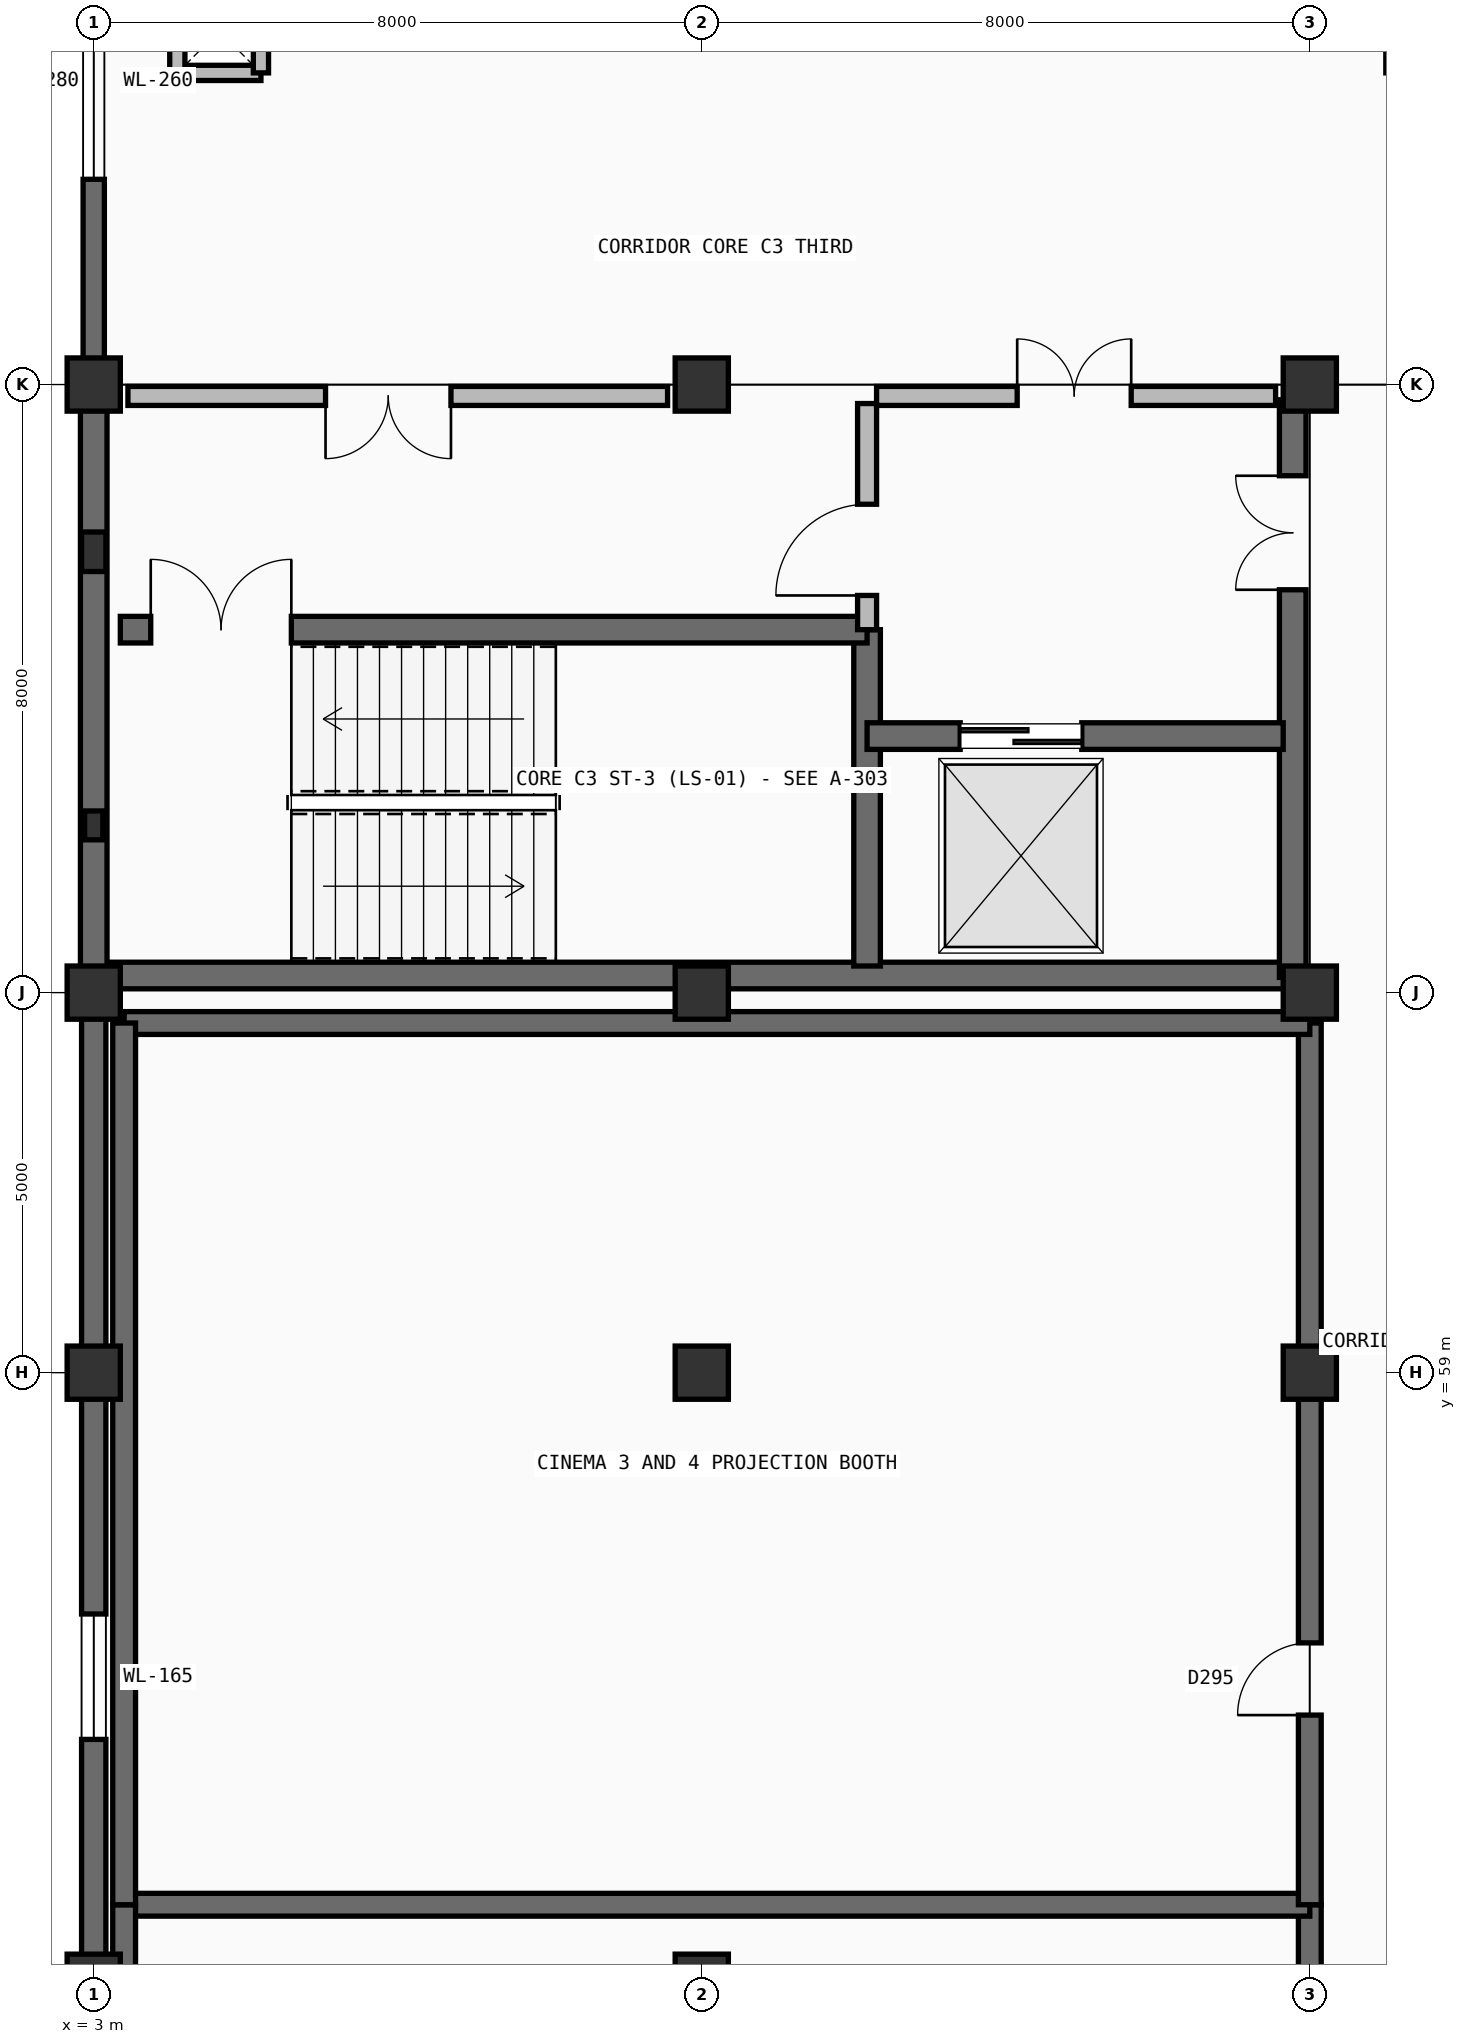
"""IFC4 building model, lengths in metres.
Left out: names, types, materials, properties, quantities, classifications, styles, units other than length and angle.
Written with IfcOpenShell. Run it as: python <this file> out.ifc"""

import sys

from ifc_helpers import new_model, si_unit, direction, frame, frame_2d, origin, origin_2d, place, context, subcontext, project, spatial, rectangle, extrude, element, fill, save


model = new_model("IFC4")
c1 = context("Model", 3, precision=1e-05, world=origin(), true_north=direction((0.0, 1.0)))
c2 = subcontext(c1, "Body", "Model", "MODEL_VIEW")
j1 = project(units=[si_unit("LENGTHUNIT", "METRE"), si_unit("PLANEANGLEUNIT", "RADIAN")], contexts=[c1])
p1 = place(None, origin())
s1 = spatial("IfcSite", under=j1, at=p1, CompositionType="ELEMENT")
p2 = place(p1, origin())
s2 = spatial("IfcBuilding", under=s1, at=p2, CompositionType="ELEMENT")
p3 = place(p2, frame((0.0, 0.0, 14.4)))
s3 = spatial("IfcBuildingStorey", under=s2, at=p3, CompositionType="ELEMENT", Elevation=14.4)
for number, where, z_axis, x_axis in (
    (1, (3.0, 51.0, 0.0), (0.0, 0.0, 1.0), (1.0, 0.0, 0.0)),
    (2, (3.0, 59.0, 0.0), (0.0, 0.0, 1.0), (1.0, 0.0, 0.0)),
    (3, (3.0, 64.0, 0.0), (0.0, 0.0, 1.0), (1.0, 0.0, 0.0)),
    (4, (3.0, 72.0, 0.0), (0.0, 0.0, 1.0), (1.0, 0.0, 0.0)),
    (5, (11.0, 51.0, 0.0), (0.0, 0.0, 1.0), (1.0, 0.0, 0.0)),
    (6, (11.0, 59.0, 0.0), (0.0, 0.0, 1.0), (1.0, 0.0, 0.0)),
    (7, (11.0, 64.0, 0.0), (0.0, 0.0, 1.0), (1.0, 0.0, 0.0)),
    (8, (11.0, 72.0, 0.0), (0.0, 0.0, 1.0), (1.0, 0.0, 0.0)),
    (9, (19.0, 59.0, 0.0), (0.0, 0.0, 1.0), (1.0, 0.0, 0.0)),
    (10, (19.0, 64.0, 0.0), (0.0, 0.0, 1.0), (1.0, 0.0, 0.0)),
    (11, (19.0, 72.0, 0.0), (0.0, 0.0, 1.0), (1.0, 0.0, 0.0)),
):
    element("IfcColumn", number, at=place(p3, frame(where, z_axis=z_axis, x_axis=x_axis)), inside=s3, PredefinedType="COLUMN", context=c2, shape_type="SweptSolid", body=[
        extrude(rectangle(XDim=0.7, YDim=0.7, at=origin_2d()), origin(), (0.0, 0.0, 1.0), 4.5),
    ])
p4 = place(p3, frame((3.0, 66.2, 0.0), z_axis=(0.0, 0.0, 1.0), x_axis=(0.0, 1.0, 0.0)))
e12 = element("IfcColumn", 12, at=p4, inside=s3, PredefinedType="PILASTER", context=c2, shape_type="SweptSolid", body=[
    extrude(rectangle(XDim=0.38, YDim=0.24, at=origin_2d()), origin(), (0.0, 0.0, 1.0), 4.5),
])
p5 = place(p3, frame((3.0, 69.8, 0.0), z_axis=(0.0, 0.0, 1.0), x_axis=(0.0, 1.0, 0.0)))
e13 = element("IfcColumn", 13, at=p5, inside=s3, PredefinedType="PILASTER", context=c2, shape_type="SweptSolid", body=[
    extrude(rectangle(XDim=0.52, YDim=0.32, at=origin_2d()), origin(), (0.0, 0.0, 1.0), 4.5),
])
p6 = place(p3, frame((3.0, 51.0, 0.0), z_axis=(0.0, 0.0, 1.0), x_axis=(0.0, 1.0, 0.0)))
e14 = element("IfcWall", 14, at=p6, inside=s3, PredefinedType="SOLIDWALL", context=c2, shape_type="SweptSolid", body=[
    extrude(rectangle(XDim=8.0, YDim=0.32, at=frame_2d((4.0, 0.0))), origin(), (0.0, 0.0, 1.0), 4.5),
])
p7 = place(p6, frame((3.175, 0.0, 1.1)))
e15 = element("IfcOpeningElement", 15, at=p7, cuts=e14, PredefinedType="OPENING", context=c2, shape_type="SweptSolid", body=[
    extrude(rectangle(XDim=1.65, YDim=0.8, at=frame_2d((0.825, 0.4))), frame((0.0, 0.17, 0.0), z_axis=(0.0, -1.0, 0.0), x_axis=(1.0, 0.0, 0.0)), (0.0, 0.0, 1.0), 0.34),
])
p8 = place(p3, frame((3.0, 59.0, 0.0), z_axis=(0.0, 0.0, 1.0), x_axis=(0.0, 1.0, 0.0)))
e16 = element("IfcWall", 16, at=p8, inside=s3, PredefinedType="SOLIDWALL", context=c2, shape_type="SweptSolid", body=[
    extrude(rectangle(XDim=5.0, YDim=0.32, at=frame_2d((2.5, 0.0))), origin(), (0.0, 0.0, 1.0), 4.5),
])
p9 = place(p3, frame((3.0, 64.0, 0.0), z_axis=(0.0, 0.0, 1.0), x_axis=(0.0, 1.0, 0.0)))
e17 = element("IfcWall", 17, at=p9, inside=s3, PredefinedType="SHEAR", context=c2, shape_type="SweptSolid", body=[
    extrude(rectangle(XDim=8.0, YDim=0.35, at=frame_2d((4.0, 0.0))), origin(), (0.0, 0.0, 1.0), 4.5),
])
p10 = place(p3, frame((3.0, 72.0, 0.0), z_axis=(0.0, 0.0, 1.0), x_axis=(0.0, 1.0, 0.0)))
e18 = element("IfcWall", 18, at=p10, inside=s3, PredefinedType="SOLIDWALL", context=c2, shape_type="SweptSolid", body=[
    extrude(rectangle(XDim=8.0, YDim=0.28, at=frame_2d((4.0, 0.0))), origin(), (0.0, 0.0, 1.0), 4.5),
])
p11 = place(p10, frame((2.7, 0.0, 1.1)))
e19 = element("IfcOpeningElement", 19, at=p11, cuts=e18, PredefinedType="OPENING", context=c2, shape_type="SweptSolid", body=[
    extrude(rectangle(XDim=2.6, YDim=1.2, at=frame_2d((1.3, 0.6))), frame((0.0, 0.15, 0.0), z_axis=(0.0, -1.0, 0.0), x_axis=(1.0, 0.0, 0.0)), (0.0, 0.0, 1.0), 0.3),
])
p12 = place(p3, frame((3.2, 64.225, 0.0), z_axis=(0.0, 0.0, 1.0), x_axis=(1.0, 0.0, 0.0)))
e20 = element("IfcWall", 20, at=p12, inside=s3, PredefinedType="SHEAR", context=c2, shape_type="SweptSolid", body=[
    extrude(rectangle(XDim=15.6, YDim=0.35, at=frame_2d((7.8, 0.0))), origin(), (0.0, 0.0, 1.0), 4.2),
])
p13 = place(p3, frame((13.175, 64.35, 0.0), z_axis=(0.0, 0.0, 1.0), x_axis=(0.0, 1.0, 0.0)))
e21 = element("IfcWall", 21, at=p13, inside=s3, PredefinedType="SHEAR", context=c2, shape_type="SweptSolid", body=[
    extrude(rectangle(XDim=4.425, YDim=0.35, at=frame_2d((2.212, 0.0))), origin(), (0.0, 0.0, 1.0), 4.2),
])
p14 = place(p3, frame((18.775, 64.2, 0.0), z_axis=(0.0, 0.0, 1.0), x_axis=(0.0, 1.0, 0.0)))
e22 = element("IfcWall", 22, at=p14, inside=s3, PredefinedType="SHEAR", context=c2, shape_type="SweptSolid", body=[
    extrude(rectangle(XDim=7.6, YDim=0.35, at=frame_2d((3.8, 0.0))), origin(), (0.0, 0.0, 1.0), 4.2),
])
p15 = place(p14, frame((5.1, 0.0, 0.0)))
e23 = element("IfcOpeningElement", 23, at=p15, cuts=e22, PredefinedType="OPENING", context=c2, shape_type="SweptSolid", body=[
    extrude(rectangle(XDim=1.5, YDim=2.2, at=frame_2d((0.75, 1.1))), frame((0.0, 0.185, 0.0), z_axis=(0.0, -1.0, 0.0), x_axis=(1.0, 0.0, 0.0)), (0.0, 0.0, 1.0), 0.37),
])
p16 = place(p3, frame((3.35, 68.775, 0.0), z_axis=(0.0, 0.0, 1.0), x_axis=(1.0, 0.0, 0.0)))
e24 = element("IfcWall", 24, at=p16, inside=s3, PredefinedType="SHEAR", context=c2, shape_type="SweptSolid", body=[
    extrude(rectangle(XDim=9.825, YDim=0.35, at=frame_2d((4.913, 0.0))), origin(), (0.0, 0.0, 1.0), 4.2),
])
p17 = place(p16, frame((0.4, 0.0, 0.0)))
e25 = element("IfcOpeningElement", 25, at=p17, cuts=e24, PredefinedType="OPENING", context=c2, shape_type="SweptSolid", body=[
    extrude(rectangle(XDim=1.85, YDim=2.25, at=frame_2d((0.925, 1.125))), frame((0.0, 0.185, 0.0), z_axis=(0.0, -1.0, 0.0), x_axis=(1.0, 0.0, 0.0)), (0.0, 0.0, 1.0), 0.37),
])
p18 = place(p3, frame((13.175, 67.375, 0.0), z_axis=(0.0, 0.0, 1.0), x_axis=(1.0, 0.0, 0.0)))
e26 = element("IfcWall", 26, at=p18, inside=s3, PredefinedType="SHEAR", context=c2, shape_type="SweptSolid", body=[
    extrude(rectangle(XDim=5.475, YDim=0.35, at=frame_2d((2.737, 0.0))), origin(), (0.0, 0.0, 1.0), 4.2),
])
p19 = place(p18, frame((1.225, 0.0, 0.0)))
e27 = element("IfcOpeningElement", 27, at=p19, cuts=e26, PredefinedType="OPENING", context=c2, shape_type="SweptSolid", body=[
    extrude(rectangle(XDim=1.6, YDim=2.4, at=frame_2d((0.8, 1.2))), frame((0.0, 0.185, 0.0), z_axis=(0.0, -1.0, 0.0), x_axis=(1.0, 0.0, 0.0)), (0.0, 0.0, 1.0), 0.37),
])
p20 = place(p3, frame((13.175, 68.775, 0.0), z_axis=(0.0, 0.0, 1.0), x_axis=(0.0, 1.0, 0.0)))
e28 = element("IfcWall", 28, at=p20, inside=s3, PredefinedType="PARTITIONING", context=c2, shape_type="SweptSolid", body=[
    extrude(rectangle(XDim=2.975, YDim=0.25, at=frame_2d((1.488, 0.0))), origin(), (0.0, 0.0, 1.0), 4.2),
])
p21 = place(p20, frame((0.45, 0.0, 0.0)))
e29 = element("IfcOpeningElement", 29, at=p21, cuts=e28, PredefinedType="OPENING", context=c2, shape_type="SweptSolid", body=[
    extrude(rectangle(XDim=1.2, YDim=2.2, at=frame_2d((0.6, 1.1))), frame((0.0, 0.135, 0.0), z_axis=(0.0, -1.0, 0.0), x_axis=(1.0, 0.0, 0.0)), (0.0, 0.0, 1.0), 0.27),
])
p22 = place(p3, frame((3.45, 71.85, 0.0), z_axis=(0.0, 0.0, 1.0), x_axis=(1.0, 0.0, 0.0)))
e30 = element("IfcWall", 30, at=p22, inside=s3, PredefinedType="PARTITIONING", context=c2, shape_type="SweptSolid", body=[
    extrude(rectangle(XDim=7.1, YDim=0.25, at=frame_2d((3.55, 0.0))), origin(), (0.0, 0.0, 1.0), 3.605),
])
p23 = place(p22, frame((2.6, 0.0, 0.0)))
e31 = element("IfcOpeningElement", 31, at=p23, cuts=e30, PredefinedType="OPENING", context=c2, shape_type="SweptSolid", body=[
    extrude(rectangle(XDim=1.65, YDim=2.25, at=frame_2d((0.825, 1.125))), frame((0.0, 0.135, 0.0), z_axis=(0.0, -1.0, 0.0), x_axis=(1.0, 0.0, 0.0)), (0.0, 0.0, 1.0), 0.27),
])
p24 = place(p3, frame((13.3, 71.85, 0.0), z_axis=(0.0, 0.0, 1.0), x_axis=(1.0, 0.0, 0.0)))
e32 = element("IfcWall", 32, at=p24, inside=s3, PredefinedType="PARTITIONING", context=c2, shape_type="SweptSolid", body=[
    extrude(rectangle(XDim=5.25, YDim=0.25, at=frame_2d((2.625, 0.0))), origin(), (0.0, 0.0, 1.0), 3.605),
])
p25 = place(p24, frame((1.85, 0.0, 0.0)))
e33 = element("IfcOpeningElement", 33, at=p25, cuts=e32, PredefinedType="OPENING", context=c2, shape_type="SweptSolid", body=[
    extrude(rectangle(XDim=1.5, YDim=2.2, at=frame_2d((0.75, 1.1))), frame((0.0, 0.135, 0.0), z_axis=(0.0, -1.0, 0.0), x_axis=(1.0, 0.0, 0.0)), (0.0, 0.0, 1.0), 0.27),
])
p26 = place(p3, frame((19.0, 38.6, 0.0), z_axis=(0.0, 0.0, 1.0), x_axis=(0.0, 1.0, 0.0)))
e34 = element("IfcWall", 34, at=p26, inside=s3, PredefinedType="SHEAR", context=c2, shape_type="SweptSolid", body=[
    extrude(rectangle(XDim=13.4, YDim=0.3, at=frame_2d((6.7, 0.0))), origin(), (0.0, 0.0, 1.0), 4.2),
])
p27 = place(p26, frame((7.674, 0.0, 0.0)))
e35 = element("IfcOpeningElement", 35, at=p27, cuts=e34, PredefinedType="OPENING", context=c2, shape_type="SweptSolid", body=[
    extrude(rectangle(XDim=1.5, YDim=2.2, at=frame_2d((0.75, 1.1))), frame((0.0, 0.16, 0.0), z_axis=(0.0, -1.0, 0.0), x_axis=(1.0, 0.0, 0.0)), (0.0, 0.0, 1.0), 0.32),
])
p28 = place(p3, frame((3.4, 52.0, 0.0), z_axis=(0.0, 0.0, 1.0), x_axis=(1.0, 0.0, 0.0)))
e36 = element("IfcWall", 36, at=p28, inside=s3, PredefinedType="SHEAR", context=c2, shape_type="SweptSolid", body=[
    extrude(rectangle(XDim=15.6, YDim=0.3, at=frame_2d((7.8, 0.0))), origin(), (0.0, 0.0, 1.0), 4.2),
])
p29 = place(p3, frame((3.4, 38.6, 0.0), z_axis=(0.0, 0.0, 1.0), x_axis=(0.0, 1.0, 0.0)))
e37 = element("IfcWall", 37, at=p29, inside=s3, PredefinedType="SHEAR", context=c2, shape_type="SweptSolid", body=[
    extrude(rectangle(XDim=13.4, YDim=0.3, at=frame_2d((6.7, 0.0))), origin(), (0.0, 0.0, 1.0), 4.2),
])
p30 = place(p3, frame((19.0, 52.0, 0.0), z_axis=(0.0, 0.0, 1.0), x_axis=(0.0, 1.0, 0.0)))
e38 = element("IfcWall", 38, at=p30, inside=s3, PredefinedType="SHEAR", context=c2, shape_type="SweptSolid", body=[
    extrude(rectangle(XDim=11.6, YDim=0.3, at=frame_2d((5.8, 0.0))), origin(), (0.0, 0.0, 1.0), 4.2),
])
p31 = place(p30, frame((2.495, 0.0, 0.0)))
e39 = element("IfcOpeningElement", 39, at=p31, cuts=e38, PredefinedType="OPENING", context=c2, shape_type="SweptSolid", body=[
    extrude(rectangle(XDim=0.95, YDim=2.1, at=frame_2d((0.475, 1.05))), frame((0.0, 0.16, 0.0), z_axis=(0.0, -1.0, 0.0), x_axis=(1.0, 0.0, 0.0)), (0.0, 0.0, 1.0), 0.32),
])
p32 = place(p3, frame((3.4, 63.6, 0.0), z_axis=(0.0, 0.0, 1.0), x_axis=(1.0, 0.0, 0.0)))
e40 = element("IfcWall", 40, at=p32, inside=s3, PredefinedType="SHEAR", context=c2, shape_type="SweptSolid", body=[
    extrude(rectangle(XDim=15.6, YDim=0.3, at=frame_2d((7.8, 0.0))), origin(), (0.0, 0.0, 1.0), 4.2),
])
p33 = place(p3, frame((3.4, 52.0, 0.0), z_axis=(0.0, 0.0, 1.0), x_axis=(0.0, 1.0, 0.0)))
e41 = element("IfcWall", 41, at=p33, inside=s3, PredefinedType="SHEAR", context=c2, shape_type="SweptSolid", body=[
    extrude(rectangle(XDim=11.6, YDim=0.3, at=frame_2d((5.8, 0.0))), origin(), (0.0, 0.0, 1.0), 4.2),
])
for number, where, z_axis, x_axis in (
    (42, (4.1, 76.1, 0.0), (0.0, 0.0, 1.0), (1.0, 0.0, 0.0)),
    (43, (4.1, 76.1, 0.0), (0.0, 0.0, 1.0), (0.0, 1.0, 0.0)),
    (44, (5.2, 76.1, 0.0), (0.0, 0.0, 1.0), (0.0, 1.0, 0.0)),
):
    element("IfcWall", number, at=place(p3, frame(where, z_axis=z_axis, x_axis=x_axis)), inside=s3, PredefinedType="PARTITIONING", context=c2, shape_type="SweptSolid", body=[
        extrude(rectangle(XDim=1.1, YDim=0.2, at=frame_2d((0.55, 0.0))), origin(), (0.0, 0.0, 1.0), 4.2),
    ])
p34 = place(p7, origin())
e45 = element("IfcWindow", 45, at=p34, inside=s3, PartitioningType="SINGLE_PANEL", PredefinedType="WINDOW", context=c2, shape_type="SweptSolid", body=[
    extrude(rectangle(XDim=1.65, YDim=0.8, at=frame_2d((0.825, 0.4))), frame((0.0, 0.03, 0.0), z_axis=(0.0, -1.0, 0.0), x_axis=(1.0, 0.0, 0.0)), (0.0, 0.0, 1.0), 0.06),
])
fill(e15, e45)
p35 = place(p11, origin())
e46 = element("IfcWindow", 46, at=p35, inside=s3, PartitioningType="SINGLE_PANEL", PredefinedType="WINDOW", context=c2, shape_type="SweptSolid", body=[
    extrude(rectangle(XDim=2.6, YDim=1.2, at=frame_2d((1.3, 0.6))), frame((0.0, 0.03, 0.0), z_axis=(0.0, -1.0, 0.0), x_axis=(1.0, 0.0, 0.0)), (0.0, 0.0, 1.0), 0.06),
])
fill(e19, e46)
p36 = place(p17, origin())
e47 = element("IfcDoor", 47, at=p36, inside=s3, OperationType="DOUBLE_DOOR_SINGLE_SWING", PredefinedType="DOOR", context=c2, shape_type="SweptSolid", body=[
    extrude(rectangle(XDim=1.85, YDim=2.25, at=frame_2d((0.925, 1.125))), frame((0.0, 0.025, 0.0), z_axis=(0.0, -1.0, 0.0), x_axis=(1.0, 0.0, 0.0)), (0.0, 0.0, 1.0), 0.05),
])
fill(e25, e47)
p37 = place(p19, origin())
e48 = element("IfcDoor", 48, at=p37, inside=s3, OperationType="DOUBLE_DOOR_SLIDING", PredefinedType="DOOR", context=c2, shape_type="SweptSolid", body=[
    extrude(rectangle(XDim=1.6, YDim=2.4, at=frame_2d((0.8, 1.2))), frame((0.0, 0.025, 0.0), z_axis=(0.0, -1.0, 0.0), x_axis=(1.0, 0.0, 0.0)), (0.0, 0.0, 1.0), 0.05),
])
fill(e27, e48)
p38 = place(p21, origin())
e49 = element("IfcDoor", 49, at=p38, inside=s3, OperationType="SINGLE_SWING_LEFT", PredefinedType="DOOR", context=c2, shape_type="SweptSolid", body=[
    extrude(rectangle(XDim=1.2, YDim=2.2, at=frame_2d((0.6, 1.1))), frame((0.0, 0.025, 0.0), z_axis=(0.0, -1.0, 0.0), x_axis=(1.0, 0.0, 0.0)), (0.0, 0.0, 1.0), 0.05),
])
fill(e29, e49)
p39 = place(p23, frame((1.65, 0.0, 0.0), z_axis=(0.0, 0.0, 1.0), x_axis=(-1.0, 0.0, 0.0)))
e50 = element("IfcDoor", 50, at=p39, inside=s3, OperationType="DOUBLE_DOOR_SINGLE_SWING", PredefinedType="DOOR", context=c2, shape_type="SweptSolid", body=[
    extrude(rectangle(XDim=1.65, YDim=2.25, at=frame_2d((0.825, 1.125))), frame((0.0, 0.025, 0.0), z_axis=(0.0, -1.0, 0.0), x_axis=(1.0, 0.0, 0.0)), (0.0, 0.0, 1.0), 0.05),
])
fill(e31, e50)
p40 = place(p25, origin())
e51 = element("IfcDoor", 51, at=p40, inside=s3, OperationType="DOUBLE_DOOR_SINGLE_SWING", PredefinedType="DOOR", context=c2, shape_type="SweptSolid", body=[
    extrude(rectangle(XDim=1.5, YDim=2.2, at=frame_2d((0.75, 1.1))), frame((0.0, 0.025, 0.0), z_axis=(0.0, -1.0, 0.0), x_axis=(1.0, 0.0, 0.0)), (0.0, 0.0, 1.0), 0.05),
])
fill(e33, e51)
p41 = place(p15, origin())
e52 = element("IfcDoor", 52, at=p41, inside=s3, OperationType="DOUBLE_DOOR_SINGLE_SWING", PredefinedType="DOOR", context=c2, shape_type="SweptSolid", body=[
    extrude(rectangle(XDim=1.5, YDim=2.2, at=frame_2d((0.75, 1.1))), frame((0.0, 0.025, 0.0), z_axis=(0.0, -1.0, 0.0), x_axis=(1.0, 0.0, 0.0)), (0.0, 0.0, 1.0), 0.05),
])
fill(e23, e52)
p42 = place(p31, origin())
e53 = element("IfcDoor", 53, at=p42, inside=s3, OperationType="SINGLE_SWING_LEFT", PredefinedType="DOOR", context=c2, shape_type="SweptSolid", body=[
    extrude(rectangle(XDim=0.95, YDim=2.1, at=frame_2d((0.475, 1.05))), frame((0.0, 0.025, 0.0), z_axis=(0.0, -1.0, 0.0), x_axis=(1.0, 0.0, 0.0)), (0.0, 0.0, 1.0), 0.05),
])
fill(e39, e53)
save(model, sys.argv[1])
